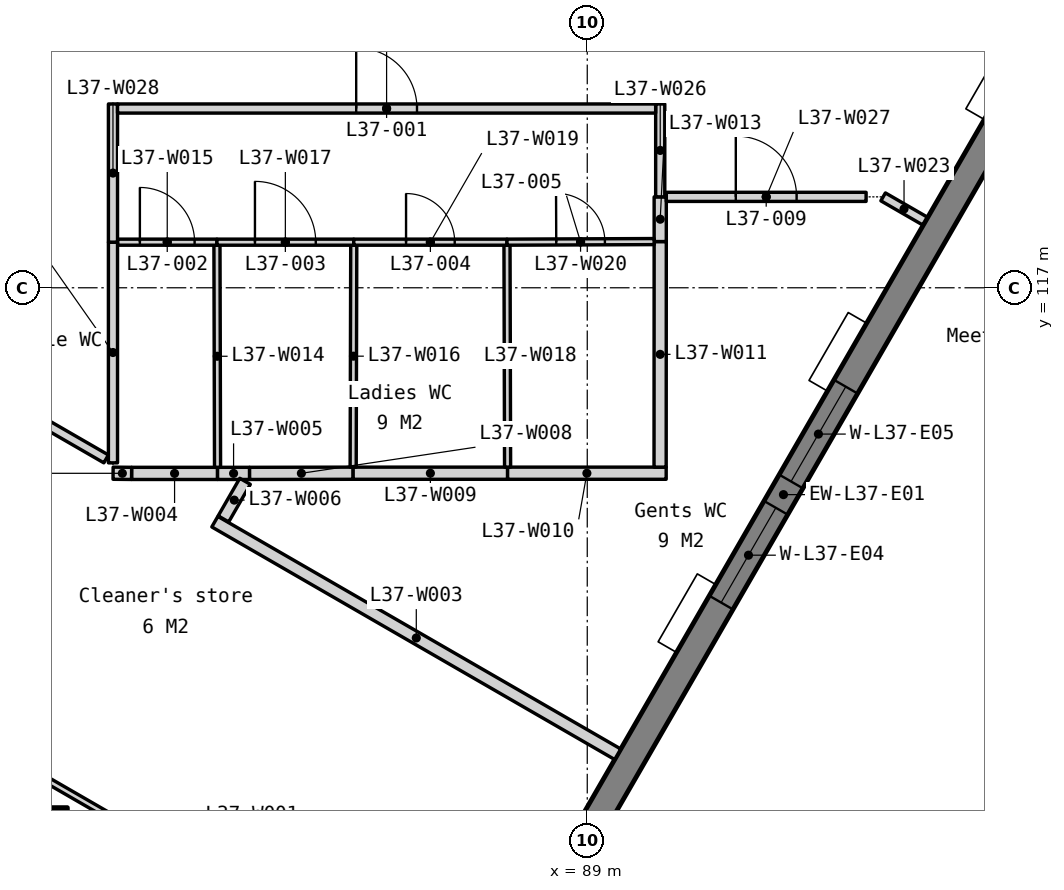
"""IFC4 building model, lengths in metres.
Left out: names, types, materials, properties, quantities, classifications, styles, units other than length and angle.
Written with IfcOpenShell. Run it as: python <this file> out.ifc"""

import sys

from ifc_helpers import new_model, si_unit, direction, frame, frame_2d, origin, origin_2d, place, context, subcontext, project, spatial, polyline, rectangle, outline, extrude, element, fill, save


model = new_model("IFC4")
c1 = context("Model", 3, precision=1e-05, world=origin(), true_north=direction((0.0, 1.0)))
c2 = subcontext(c1, "Body", "Model", "MODEL_VIEW")
j1 = project(units=[si_unit("LENGTHUNIT", "METRE"), si_unit("PLANEANGLEUNIT", "RADIAN")], contexts=[c1])
p1 = place(None, origin())
s1 = spatial("IfcSite", under=j1, at=p1, CompositionType="ELEMENT")
p2 = place(p1, origin())
s2 = spatial("IfcBuilding", under=s1, at=p2, CompositionType="ELEMENT")
p3 = place(p2, frame((0.0, 0.0, 148.1)))
s3 = spatial("IfcBuildingStorey", under=s2, at=p3, CompositionType="ELEMENT", Elevation=148.1)
p4 = place(p3, frame((80.0, 108.0, 0.0), z_axis=(0.0, 0.0, 1.0), x_axis=(1.0, 0.0, 0.0)))
e1 = element("IfcColumn", 1, at=p4, inside=s3, PredefinedType="COLUMN", context=c2, shape_type="SweptSolid", body=[
    extrude(rectangle(XDim=0.9, YDim=0.9, at=origin_2d()), origin(), (0.0, 0.0, 1.0), 3.9),
])
p5 = place(p3, frame((82.105, 96.067, -0.15), z_axis=(0.0, 0.0, 1.0), x_axis=(0.499997369791, 0.866026922331, 0.0)))
e2 = element("IfcWall", 2, at=p5, inside=s3, PredefinedType="SOLIDWALL", context=c2, shape_type="SweptSolid", body=[
    extrude(outline(polyline([(40.486, 0.0), (40.486, 3.9), (0.0, 3.9), (0.0, 0.0), (40.486, 0.0)])), frame((0.0, 0.225, 0.0), z_axis=(0.0, -1.0, 0.0), x_axis=(1.0, 0.0, 0.0)), (0.0, 0.0, 1.0), 0.45),
])
p6 = place(p5, frame((0.837, 0.0, 0.95)))
e3 = element("IfcOpeningElement", 3, at=p6, cuts=e2, PredefinedType="OPENING", context=c2, shape_type="SweptSolid", body=[
    extrude(rectangle(XDim=1.2, YDim=2.2, at=frame_2d((0.6, 1.1))), frame((0.0, 0.235, 0.0), z_axis=(0.0, -1.0, 0.0), x_axis=(1.0, 0.0, 0.0)), (0.0, 0.0, 1.0), 0.47),
])
p7 = place(p5, frame((8.072, 0.0, 0.95)))
e4 = element("IfcOpeningElement", 4, at=p7, cuts=e2, PredefinedType="OPENING", context=c2, shape_type="SweptSolid", body=[
    extrude(rectangle(XDim=1.8, YDim=2.2, at=frame_2d((0.9, 1.1))), frame((0.0, 0.235, 0.0), z_axis=(0.0, -1.0, 0.0), x_axis=(1.0, 0.0, 0.0)), (0.0, 0.0, 1.0), 0.47),
])
p8 = place(p5, frame((10.372, 0.0, 0.95)))
e5 = element("IfcOpeningElement", 5, at=p8, cuts=e2, PredefinedType="OPENING", context=c2, shape_type="SweptSolid", body=[
    extrude(rectangle(XDim=1.8, YDim=2.2, at=frame_2d((0.9, 1.1))), frame((0.0, 0.235, 0.0), z_axis=(0.0, -1.0, 0.0), x_axis=(1.0, 0.0, 0.0)), (0.0, 0.0, 1.0), 0.47),
])
p9 = place(p5, frame((18.193, 0.0, 0.95)))
e6 = element("IfcOpeningElement", 6, at=p9, cuts=e2, PredefinedType="OPENING", context=c2, shape_type="SweptSolid", body=[
    extrude(rectangle(XDim=1.8, YDim=2.2, at=frame_2d((0.9, 1.1))), frame((0.0, 0.235, 0.0), z_axis=(0.0, -1.0, 0.0), x_axis=(1.0, 0.0, 0.0)), (0.0, 0.0, 1.0), 0.47),
])
p10 = place(p5, frame((20.493, 0.0, 0.95)))
e7 = element("IfcOpeningElement", 7, at=p10, cuts=e2, PredefinedType="OPENING", context=c2, shape_type="SweptSolid", body=[
    extrude(rectangle(XDim=1.8, YDim=2.2, at=frame_2d((0.9, 1.1))), frame((0.0, 0.235, 0.0), z_axis=(0.0, -1.0, 0.0), x_axis=(1.0, 0.0, 0.0)), (0.0, 0.0, 1.0), 0.47),
])
p11 = place(p5, frame((28.315, 0.0, 0.95)))
e8 = element("IfcOpeningElement", 8, at=p11, cuts=e2, PredefinedType="OPENING", context=c2, shape_type="SweptSolid", body=[
    extrude(rectangle(XDim=1.8, YDim=2.2, at=frame_2d((0.9, 1.1))), frame((0.0, 0.235, 0.0), z_axis=(0.0, -1.0, 0.0), x_axis=(1.0, 0.0, 0.0)), (0.0, 0.0, 1.0), 0.47),
])
p12 = place(p5, frame((30.615, 0.0, 0.95)))
e9 = element("IfcOpeningElement", 9, at=p12, cuts=e2, PredefinedType="OPENING", context=c2, shape_type="SweptSolid", body=[
    extrude(rectangle(XDim=1.8, YDim=2.2, at=frame_2d((0.9, 1.1))), frame((0.0, 0.235, 0.0), z_axis=(0.0, -1.0, 0.0), x_axis=(1.0, 0.0, 0.0)), (0.0, 0.0, 1.0), 0.47),
])
p13 = place(p5, frame((38.449, 0.0, 0.95)))
e10 = element("IfcOpeningElement", 10, at=p13, cuts=e2, PredefinedType="OPENING", context=c2, shape_type="SweptSolid", body=[
    extrude(rectangle(XDim=1.2, YDim=2.2, at=frame_2d((0.6, 1.1))), frame((0.0, 0.235, 0.0), z_axis=(0.0, -1.0, 0.0), x_axis=(1.0, 0.0, 0.0)), (0.0, 0.0, 1.0), 0.47),
])
p14 = place(p3, frame((80.001, 108.969, 0.0), z_axis=(0.0, 0.0, 1.0), x_axis=(0.866022419898, -0.500005168208, 0.0)))
e11 = element("IfcWall", 11, at=p14, inside=s3, PredefinedType="PARTITIONING", context=c2, shape_type="SweptSolid", body=[
    extrude(rectangle(XDim=8.048, YDim=0.1, at=frame_2d((4.024, 0.0))), origin(), (0.0, 0.0, 1.0), 3.75),
])
p15 = place(p14, frame((3.574, 0.0, 0.0)))
e12 = element("IfcOpeningElement", 12, at=p15, cuts=e11, PredefinedType="OPENING", context=c2, shape_type="SweptSolid", body=[
    extrude(rectangle(XDim=0.9, YDim=2.1, at=frame_2d((0.45, 1.05))), frame((0.0, 0.06, 0.0), z_axis=(0.0, -1.0, 0.0), x_axis=(1.0, 0.0, 0.0)), (0.0, 0.0, 1.0), 0.12),
])
p16 = place(p3, frame((82.875, 113.153, 0.0), z_axis=(0.0, 0.0, 1.0), x_axis=(0.866037336609, -0.499979331172, 0.0)))
e13 = element("IfcWall", 13, at=p16, inside=s3, PredefinedType="PARTITIONING", context=c2, shape_type="SweptSolid", body=[
    extrude(rectangle(XDim=7.651, YDim=0.2, at=frame_2d((3.826, 0.0))), origin(), (0.0, 0.0, 1.0), 3.75),
])
p17 = place(p3, frame((81.506, 113.947, 0.0), z_axis=(0.0, 0.0, 1.0), x_axis=(1.0, 0.0, 0.0)))
e14 = element("IfcWall", 14, at=p17, inside=s3, PredefinedType="PARTITIONING", context=c2, shape_type="SweptSolid", body=[
    extrude(rectangle(XDim=1.414, YDim=0.2, at=frame_2d((0.707, 0.0))), origin(), (0.0, 0.0, 1.0), 3.75),
])
p18 = place(p3, frame((82.92, 113.947, 0.0), z_axis=(0.0, 0.0, 1.0), x_axis=(1.0, 0.0, 0.0)))
e15 = element("IfcWall", 15, at=p18, inside=s3, PredefinedType="PARTITIONING", context=c2, shape_type="SweptSolid", body=[
    extrude(rectangle(XDim=0.527, YDim=0.2, at=frame_2d((0.264, 0.0))), origin(), (0.0, 0.0, 1.0), 3.75),
])
p19 = place(p3, frame((83.017, 113.198, 0.0), z_axis=(0.0, 0.0, 1.0), x_axis=(0.498606139328, 0.866828655401, 0.0)))
e16 = element("IfcWall", 16, at=p19, inside=s3, PredefinedType="PARTITIONING", context=c2, shape_type="SweptSolid", body=[
    extrude(rectangle(XDim=0.713, YDim=0.2, at=frame_2d((0.357, 0.0))), origin(), (0.0, 0.0, 1.0), 3.75),
])
p20 = place(p3, frame((81.202, 113.95, 0.0), z_axis=(0.0, 0.0, 1.0), x_axis=(0.999953701233, -0.009622649892, 0.0)))
e17 = element("IfcWall", 17, at=p20, inside=s3, PredefinedType="PARTITIONING", context=c2, shape_type="SweptSolid", body=[
    extrude(rectangle(XDim=0.304, YDim=0.2, at=frame_2d((0.152, 0.0))), origin(), (0.0, 0.0, 1.0), 3.75),
])
p21 = place(p3, frame((83.447, 113.947, 0.0), z_axis=(0.0, 0.0, 1.0), x_axis=(0.999998520063, 0.001720427561, 0.0)))
e18 = element("IfcWall", 18, at=p21, inside=s3, PredefinedType="PARTITIONING", context=c2, shape_type="SweptSolid", body=[
    extrude(rectangle(XDim=1.703, YDim=0.2, at=frame_2d((0.852, 0.0))), origin(), (0.0, 0.0, 1.0), 3.75),
])
p22 = place(p3, frame((85.15, 113.95, 0.0), z_axis=(0.0, 0.0, 1.0), x_axis=(1.0, 0.0, 0.0)))
e19 = element("IfcWall", 19, at=p22, inside=s3, PredefinedType="PARTITIONING", context=c2, shape_type="SweptSolid", body=[
    extrude(rectangle(XDim=2.54, YDim=0.2, at=frame_2d((1.27, 0.0))), origin(), (0.0, 0.0, 1.0), 3.75),
])
p23 = place(p3, frame((87.69, 113.95, 0.0), z_axis=(0.0, 0.0, 1.0), x_axis=(1.0, 0.0, 0.0)))
e20 = element("IfcWall", 20, at=p23, inside=s3, PredefinedType="PARTITIONING", context=c2, shape_type="SweptSolid", body=[
    extrude(rectangle(XDim=2.608, YDim=0.2, at=frame_2d((1.304, 0.0))), origin(), (0.0, 0.0, 1.0), 3.75),
])
p24 = place(p3, frame((90.198, 114.05, 0.0), z_axis=(0.0, 0.0, 1.0), x_axis=(0.000526454257, 0.999999861423, 0.0)))
e21 = element("IfcWall", 21, at=p24, inside=s3, PredefinedType="PARTITIONING", context=c2, shape_type="SweptSolid", body=[
    extrude(rectangle(XDim=3.71, YDim=0.2, at=frame_2d((1.855, 0.0))), origin(), (0.0, 0.0, 1.0), 3.75),
])
p25 = place(p3, frame((90.2, 117.76, 0.0), z_axis=(0.0, 0.0, 1.0), x_axis=(0.0, 1.0, 0.0)))
e22 = element("IfcWall", 22, at=p25, inside=s3, PredefinedType="PARTITIONING", context=c2, shape_type="SweptSolid", body=[
    extrude(rectangle(XDim=0.735, YDim=0.2, at=frame_2d((0.368, 0.0))), origin(), (0.0, 0.0, 1.0), 3.75),
])
p26 = place(p3, frame((82.92, 114.047, 0.0), z_axis=(0.0, 0.0, 1.0), x_axis=(-0.00260659454, 0.999996602827, 0.0)))
e23 = element("IfcWall", 23, at=p26, inside=s3, PredefinedType="PARTITIONING", context=c2, shape_type="SweptSolid", body=[
    extrude(rectangle(XDim=3.653, YDim=0.1, at=frame_2d((1.826, 0.0))), origin(), (0.0, 0.0, 1.0), 3.75),
])
p27 = place(p3, frame((81.275, 117.75, 0.0), z_axis=(0.0, 0.0, 1.0), x_axis=(1.0, 0.0, 0.0)))
e24 = element("IfcWall", 24, at=p27, inside=s3, PredefinedType="PARTITIONING", context=c2, shape_type="SweptSolid", body=[
    extrude(rectangle(XDim=1.635, YDim=0.1, at=frame_2d((0.817, 0.0))), origin(), (0.0, 0.0, 1.0), 3.75),
])
p28 = place(p27, frame((0.367, 0.0, 0.0)))
e25 = element("IfcOpeningElement", 25, at=p28, cuts=e24, PredefinedType="OPENING", context=c2, shape_type="SweptSolid", body=[
    extrude(rectangle(XDim=0.9, YDim=2.1, at=frame_2d((0.45, 1.05))), frame((0.0, 0.06, 0.0), z_axis=(0.0, -1.0, 0.0), x_axis=(1.0, 0.0, 0.0)), (0.0, 0.0, 1.0), 0.12),
])
p29 = place(p3, frame((85.15, 114.05, 0.0), z_axis=(0.0, 0.0, 1.0), x_axis=(0.002675575707, 0.999996420641, 0.0)))
e26 = element("IfcWall", 26, at=p29, inside=s3, PredefinedType="PARTITIONING", context=c2, shape_type="SweptSolid", body=[
    extrude(rectangle(XDim=3.65, YDim=0.1, at=frame_2d((1.825, 0.0))), origin(), (0.0, 0.0, 1.0), 3.75),
])
p30 = place(p3, frame((82.91, 117.75, 0.0), z_axis=(0.0, 0.0, 1.0), x_axis=(1.0, 0.0, 0.0)))
e27 = element("IfcWall", 27, at=p30, inside=s3, PredefinedType="PARTITIONING", context=c2, shape_type="SweptSolid", body=[
    extrude(rectangle(XDim=2.25, YDim=0.1, at=frame_2d((1.125, 0.0))), origin(), (0.0, 0.0, 1.0), 3.75),
])
p31 = place(p30, frame((0.625, 0.0, 0.0)))
e28 = element("IfcOpeningElement", 28, at=p31, cuts=e27, PredefinedType="OPENING", context=c2, shape_type="SweptSolid", body=[
    extrude(rectangle(XDim=1.0, YDim=2.1, at=frame_2d((0.5, 1.05))), frame((0.0, 0.06, 0.0), z_axis=(0.0, -1.0, 0.0), x_axis=(1.0, 0.0, 0.0)), (0.0, 0.0, 1.0), 0.12),
])
p32 = place(p3, frame((87.69, 114.05, 0.0), z_axis=(0.0, 0.0, 1.0), x_axis=(-0.002608686776, 0.999996597371, 0.0)))
e29 = element("IfcWall", 29, at=p32, inside=s3, PredefinedType="PARTITIONING", context=c2, shape_type="SweptSolid", body=[
    extrude(rectangle(XDim=3.65, YDim=0.1, at=frame_2d((1.825, 0.0))), origin(), (0.0, 0.0, 1.0), 3.75),
])
p33 = place(p3, frame((85.16, 117.75, 0.0), z_axis=(0.0, 0.0, 1.0), x_axis=(1.0, 0.0, 0.0)))
e30 = element("IfcWall", 30, at=p33, inside=s3, PredefinedType="PARTITIONING", context=c2, shape_type="SweptSolid", body=[
    extrude(rectangle(XDim=2.52, YDim=0.1, at=frame_2d((1.26, 0.0))), origin(), (0.0, 0.0, 1.0), 3.75),
])
p34 = place(p33, frame((0.86, 0.0, 0.0)))
e31 = element("IfcOpeningElement", 31, at=p34, cuts=e30, PredefinedType="OPENING", context=c2, shape_type="SweptSolid", body=[
    extrude(rectangle(XDim=0.8, YDim=2.1, at=frame_2d((0.4, 1.05))), frame((0.0, 0.06, 0.0), z_axis=(0.0, -1.0, 0.0), x_axis=(1.0, 0.0, 0.0)), (0.0, 0.0, 1.0), 0.12),
])
p35 = place(p3, frame((87.68, 117.75, 0.0), z_axis=(0.0, 0.0, 1.0), x_axis=(0.999992261016, 0.003934197335, 0.0)))
e32 = element("IfcWall", 32, at=p35, inside=s3, PredefinedType="PARTITIONING", context=c2, shape_type="SweptSolid", body=[
    extrude(rectangle(XDim=2.42, YDim=0.1, at=frame_2d((1.21, 0.0))), origin(), (0.0, 0.0, 1.0), 3.75),
])
p36 = place(p35, frame((0.81, 0.0, 0.0)))
e33 = element("IfcOpeningElement", 33, at=p36, cuts=e32, PredefinedType="OPENING", context=c2, shape_type="SweptSolid", body=[
    extrude(rectangle(XDim=0.8, YDim=2.1, at=frame_2d((0.4, 1.05))), frame((0.0, 0.06, 0.0), z_axis=(0.0, -1.0, 0.0), x_axis=(1.0, 0.0, 0.0)), (0.0, 0.0, 1.0), 0.12),
])
p37 = place(p3, frame((81.2, 114.12, 0.0), z_axis=(0.0, 0.0, 1.0), x_axis=(0.0, 1.0, 0.0)))
e34 = element("IfcWall", 34, at=p37, inside=s3, PredefinedType="PARTITIONING", context=c2, shape_type="SweptSolid", body=[
    extrude(rectangle(XDim=3.63, YDim=0.15, at=frame_2d((1.815, 0.0))), origin(), (0.0, 0.0, 1.0), 3.75),
])
p38 = place(p3, frame((93.866, 118.495, 0.0), z_axis=(0.0, 0.0, 1.0), x_axis=(0.866078079006, -0.499908752739, 0.0)))
e35 = element("IfcWall", 35, at=p38, inside=s3, PredefinedType="PARTITIONING", context=c2, shape_type="SweptSolid", body=[
    extrude(rectangle(XDim=0.794, YDim=0.15, at=frame_2d((0.397, 0.0))), origin(), (0.0, 0.0, 1.0), 3.75),
])
p39 = place(p3, frame((73.865, 118.355, 0.0), z_axis=(0.0, 0.0, 1.0), x_axis=(0.866024234027, -0.500002026074, 0.0)))
e36 = element("IfcWall", 36, at=p39, inside=s3, PredefinedType="PARTITIONING", context=c2, shape_type="SweptSolid", body=[
    extrude(rectangle(XDim=8.34, YDim=0.15, at=frame_2d((4.17, 0.0))), origin(), (0.0, 0.0, 1.0), 3.75),
])
p40 = place(p39, frame((3.27, 0.0, 0.0)))
e37 = element("IfcOpeningElement", 37, at=p40, cuts=e36, PredefinedType="OPENING", context=c2, shape_type="SweptSolid", body=[
    extrude(rectangle(XDim=1.8, YDim=2.1, at=frame_2d((0.9, 1.05))), frame((0.0, 0.085, 0.0), z_axis=(0.0, -1.0, 0.0), x_axis=(1.0, 0.0, 0.0)), (0.0, 0.0, 1.0), 0.17),
])
p41 = place(p3, frame((90.2, 118.495, 0.0), z_axis=(0.0, 0.0, 1.0), x_axis=(0.0, 1.0, 0.0)))
e38 = element("IfcWall", 38, at=p41, inside=s3, PredefinedType="PARTITIONING", context=c2, shape_type="SweptSolid", body=[
    extrude(rectangle(XDim=1.528, YDim=0.15, at=frame_2d((0.764, 0.0))), origin(), (0.0, 0.0, 1.0), 3.75),
])
p42 = place(p3, frame((90.3, 118.495, 0.0), z_axis=(0.0, 0.0, 1.0), x_axis=(0.99999999724, -7.4299725e-05, 0.0)))
e39 = element("IfcWall", 39, at=p42, inside=s3, PredefinedType="PARTITIONING", context=c2, shape_type="SweptSolid", body=[
    extrude(rectangle(XDim=3.286, YDim=0.15, at=frame_2d((1.643, 0.0))), origin(), (0.0, 0.0, 1.0), 3.75),
])
p43 = place(p42, frame((1.143, 0.0, 0.0)))
e40 = element("IfcOpeningElement", 40, at=p43, cuts=e39, PredefinedType="OPENING", context=c2, shape_type="SweptSolid", body=[
    extrude(rectangle(XDim=1.0, YDim=2.1, at=frame_2d((0.5, 1.05))), frame((0.0, 0.085, 0.0), z_axis=(0.0, -1.0, 0.0), x_axis=(1.0, 0.0, 0.0)), (0.0, 0.0, 1.0), 0.17),
])
p44 = place(p3, frame((81.2, 117.75, 0.0), z_axis=(0.0, 0.0, 1.0), x_axis=(0.0, 1.0, 0.0)))
e41 = element("IfcWall", 41, at=p44, inside=s3, PredefinedType="PARTITIONING", context=c2, shape_type="SweptSolid", body=[
    extrude(rectangle(XDim=2.273, YDim=0.15, at=frame_2d((1.136, 0.0))), origin(), (0.0, 0.0, 1.0), 3.75),
])
p45 = place(p3, frame((81.275, 119.948, 0.0), z_axis=(0.0, 0.0, 1.0), x_axis=(1.0, 0.0, 0.0)))
e42 = element("IfcWall", 42, at=p45, inside=s3, PredefinedType="PARTITIONING", context=c2, shape_type="SweptSolid", body=[
    extrude(rectangle(XDim=8.85, YDim=0.15, at=frame_2d((4.425, 0.0))), origin(), (0.0, 0.0, 1.0), 3.75),
])
p46 = place(p45, frame((3.925, 0.0, 0.0)))
e43 = element("IfcOpeningElement", 43, at=p46, cuts=e42, PredefinedType="OPENING", context=c2, shape_type="SweptSolid", body=[
    extrude(rectangle(XDim=1.0, YDim=2.1, at=frame_2d((0.5, 1.05))), frame((0.0, 0.085, 0.0), z_axis=(0.0, -1.0, 0.0), x_axis=(1.0, 0.0, 0.0)), (0.0, 0.0, 1.0), 0.17),
])
p47 = place(p9, origin())
e44 = element("IfcWindow", 44, at=p47, inside=s3, PartitioningType="SINGLE_PANEL", PredefinedType="WINDOW", context=c2, shape_type="SweptSolid", body=[
    extrude(rectangle(XDim=1.8, YDim=2.2, at=frame_2d((0.9, 1.1))), frame((0.0, 0.03, 0.0), z_axis=(0.0, -1.0, 0.0), x_axis=(1.0, 0.0, 0.0)), (0.0, 0.0, 1.0), 0.06),
])
fill(e6, e44)
p48 = place(p10, origin())
e45 = element("IfcWindow", 45, at=p48, inside=s3, PartitioningType="SINGLE_PANEL", PredefinedType="WINDOW", context=c2, shape_type="SweptSolid", body=[
    extrude(rectangle(XDim=1.8, YDim=2.2, at=frame_2d((0.9, 1.1))), frame((0.0, 0.03, 0.0), z_axis=(0.0, -1.0, 0.0), x_axis=(1.0, 0.0, 0.0)), (0.0, 0.0, 1.0), 0.06),
])
fill(e7, e45)
p49 = place(p46, origin())
e46 = element("IfcDoor", 46, at=p49, inside=s3, OperationType="SINGLE_SWING_LEFT", PredefinedType="DOOR", context=c2, shape_type="SweptSolid", body=[
    extrude(rectangle(XDim=1.0, YDim=2.1, at=frame_2d((0.5, 1.05))), frame((0.0, 0.025, 0.0), z_axis=(0.0, -1.0, 0.0), x_axis=(1.0, 0.0, 0.0)), (0.0, 0.0, 1.0), 0.05),
])
fill(e43, e46)
p50 = place(p28, origin())
e47 = element("IfcDoor", 47, at=p50, inside=s3, OperationType="SINGLE_SWING_LEFT", PredefinedType="DOOR", context=c2, shape_type="SweptSolid", body=[
    extrude(rectangle(XDim=0.9, YDim=2.1, at=frame_2d((0.45, 1.05))), frame((0.0, 0.025, 0.0), z_axis=(0.0, -1.0, 0.0), x_axis=(1.0, 0.0, 0.0)), (0.0, 0.0, 1.0), 0.05),
])
fill(e25, e47)
p51 = place(p31, origin())
e48 = element("IfcDoor", 48, at=p51, inside=s3, OperationType="SINGLE_SWING_LEFT", PredefinedType="DOOR", context=c2, shape_type="SweptSolid", body=[
    extrude(rectangle(XDim=1.0, YDim=2.1, at=frame_2d((0.5, 1.05))), frame((0.0, 0.025, 0.0), z_axis=(0.0, -1.0, 0.0), x_axis=(1.0, 0.0, 0.0)), (0.0, 0.0, 1.0), 0.05),
])
fill(e28, e48)
p52 = place(p34, origin())
e49 = element("IfcDoor", 49, at=p52, inside=s3, OperationType="SINGLE_SWING_LEFT", PredefinedType="DOOR", context=c2, shape_type="SweptSolid", body=[
    extrude(rectangle(XDim=0.8, YDim=2.1, at=frame_2d((0.4, 1.05))), frame((0.0, 0.025, 0.0), z_axis=(0.0, -1.0, 0.0), x_axis=(1.0, 0.0, 0.0)), (0.0, 0.0, 1.0), 0.05),
])
fill(e31, e49)
p53 = place(p36, origin())
e50 = element("IfcDoor", 50, at=p53, inside=s3, OperationType="SINGLE_SWING_LEFT", PredefinedType="DOOR", context=c2, shape_type="SweptSolid", body=[
    extrude(rectangle(XDim=0.8, YDim=2.1, at=frame_2d((0.4, 1.05))), frame((0.0, 0.025, 0.0), z_axis=(0.0, -1.0, 0.0), x_axis=(1.0, 0.0, 0.0)), (0.0, 0.0, 1.0), 0.05),
])
fill(e33, e50)
p54 = place(p43, origin())
e51 = element("IfcDoor", 51, at=p54, inside=s3, OperationType="SINGLE_SWING_LEFT", PredefinedType="DOOR", context=c2, shape_type="SweptSolid", body=[
    extrude(rectangle(XDim=1.0, YDim=2.1, at=frame_2d((0.5, 1.05))), frame((0.0, 0.025, 0.0), z_axis=(0.0, -1.0, 0.0), x_axis=(1.0, 0.0, 0.0)), (0.0, 0.0, 1.0), 0.05),
])
fill(e40, e51)
save(model, sys.argv[1])
